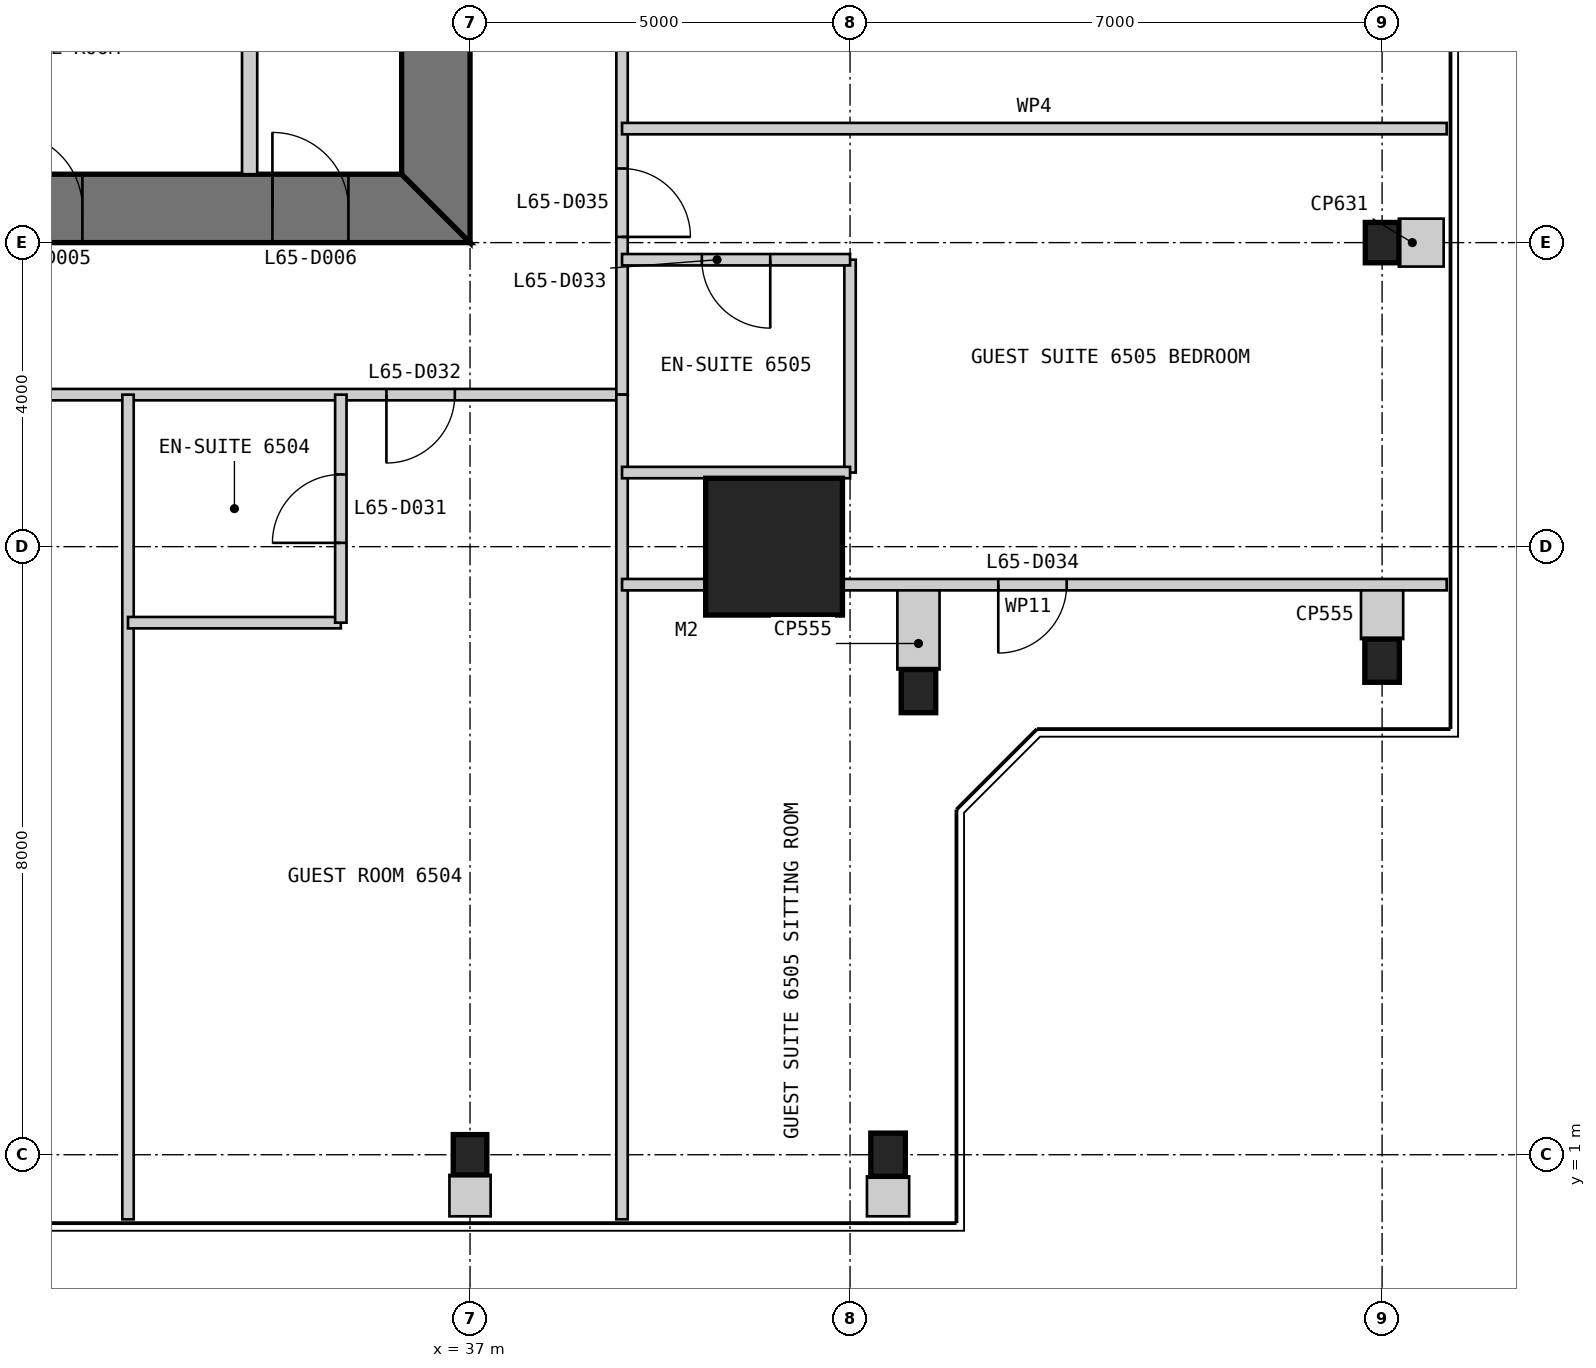
"""IFC4 building model, lengths in metres.
Left out: names, types, materials, properties, quantities, classifications, styles, units other than length and angle.
Written with IfcOpenShell. Run it as: python <this file> out.ifc"""

import sys

from ifc_helpers import new_model, si_unit, direction, frame, frame_2d, origin, origin_2d, place, context, subcontext, project, spatial, polyline, rectangle, i_section, outline, extrude, element, fill, save


model = new_model("IFC4")
c1 = context("Model", 3, precision=1e-05, world=origin(), true_north=direction((0.0, 1.0)))
c2 = subcontext(c1, "Body", "Model", "MODEL_VIEW")
j1 = project(units=[si_unit("LENGTHUNIT", "METRE"), si_unit("PLANEANGLEUNIT", "RADIAN")], contexts=[c1])
p1 = place(None, origin())
s1 = spatial("IfcSite", under=j1, at=p1, CompositionType="ELEMENT")
p2 = place(p1, origin())
s2 = spatial("IfcBuilding", under=s1, at=p2, CompositionType="ELEMENT")
p3 = place(p2, frame((0.0, 0.0, 273.0)))
s3 = spatial("IfcBuildingStorey", under=s2, at=p3, CompositionType="ELEMENT", Elevation=273.0)
p4 = place(p3, frame((41.0, 9.0, 0.0), z_axis=(0.0, 0.0, 1.0), x_axis=(1.0, 0.0, 0.0)))
e1 = element("IfcColumn", 1, at=p4, inside=s3, PredefinedType="COLUMN", context=c2, shape_type="SweptSolid", body=[
    extrude(rectangle(XDim=1.8, YDim=1.8, at=origin_2d()), origin(), (0.0, 0.0, 1.0), 3.4),
])
p5 = place(p3, frame((37.0, 1.0, 0.0), z_axis=(0.0, 0.0, 1.0), x_axis=(1.0, 0.0, 0.0)))
e2 = element("IfcColumn", 2, at=p5, inside=s3, PredefinedType="COLUMN", context=c2, shape_type="SweptSolid", body=[
    extrude(i_section(OverallWidth=0.442, OverallDepth=0.531, WebThickness=0.066, FlangeThickness=0.106, at=origin_2d()), origin(), (0.0, 0.0, 1.0), 3.4),
])
for number, where, z_axis, x_axis in (
    (3, (42.5, 1.0, 0.0), (0.0, 0.0, 1.0), (1.0, 0.0, 0.0)),
    (4, (42.9, 7.1, 0.0), (0.0, 0.0, 1.0), (1.0, 0.0, 0.0)),
    (5, (49.0, 7.5, 0.0), (0.0, 0.0, 1.0), (1.0, 0.0, 0.0)),
):
    element("IfcColumn", number, at=place(p3, frame(where, z_axis=z_axis, x_axis=x_axis)), inside=s3, PredefinedType="COLUMN", context=c2, shape_type="SweptSolid", body=[
        extrude(i_section(OverallWidth=0.455, OverallDepth=0.569, WebThickness=0.078, FlangeThickness=0.125, at=origin_2d()), origin(), (0.0, 0.0, 1.0), 3.4),
    ])
p6 = place(p3, frame((49.0, 13.0, 0.0), z_axis=(0.0, 0.0, 1.0), x_axis=(1.0, 0.0, 0.0)))
e6 = element("IfcColumn", 6, at=p6, inside=s3, PredefinedType="COLUMN", context=c2, shape_type="SweptSolid", body=[
    extrude(i_section(OverallWidth=0.442, OverallDepth=0.531, WebThickness=0.066, FlangeThickness=0.106, at=origin_2d()), origin(), (0.0, 0.0, 1.0), 3.4),
])
p7 = place(p3, frame((13.0, 13.45, 0.0), z_axis=(0.0, 0.0, 1.0), x_axis=(1.0, 0.0, 0.0)))
e7 = element("IfcWall", 7, at=p7, inside=s3, PredefinedType="SHEAR", context=c2, shape_type="SweptSolid", body=[
    extrude(outline(polyline([(0.0, -0.45), (24.0, -0.45), (23.1, 0.45), (0.9, 0.45), (0.0, -0.45)])), origin(), (0.0, 0.0, 1.0), 3.4),
])
p8 = place(p7, frame((4.9, 0.0, 0.0)))
e8 = element("IfcOpeningElement", 8, at=p8, cuts=e7, PredefinedType="OPENING", context=c2, shape_type="SweptSolid", body=[
    extrude(rectangle(XDim=1.0, YDim=2.2, at=frame_2d((0.5, 1.1))), frame((0.0, 0.46, 0.0), z_axis=(0.0, -1.0, 0.0), x_axis=(1.0, 0.0, 0.0)), (0.0, 0.0, 1.0), 0.92),
])
p9 = place(p7, frame((8.9, 0.0, 0.0)))
e9 = element("IfcOpeningElement", 9, at=p9, cuts=e7, PredefinedType="OPENING", context=c2, shape_type="SweptSolid", body=[
    extrude(rectangle(XDim=1.1, YDim=2.2, at=frame_2d((0.55, 1.1))), frame((0.0, 0.46, 0.0), z_axis=(0.0, -1.0, 0.0), x_axis=(1.0, 0.0, 0.0)), (0.0, 0.0, 1.0), 0.92),
])
p10 = place(p7, frame((15.05, 0.0, 0.0)))
e10 = element("IfcOpeningElement", 10, at=p10, cuts=e7, PredefinedType="OPENING", context=c2, shape_type="SweptSolid", body=[
    extrude(rectangle(XDim=0.9, YDim=2.2, at=frame_2d((0.45, 1.1))), frame((0.0, 0.46, 0.0), z_axis=(0.0, -1.0, 0.0), x_axis=(1.0, 0.0, 0.0)), (0.0, 0.0, 1.0), 0.92),
])
p11 = place(p7, frame((17.9, 0.0, 0.0)))
e11 = element("IfcOpeningElement", 11, at=p11, cuts=e7, PredefinedType="OPENING", context=c2, shape_type="SweptSolid", body=[
    extrude(rectangle(XDim=1.0, YDim=2.2, at=frame_2d((0.5, 1.1))), frame((0.0, 0.46, 0.0), z_axis=(0.0, -1.0, 0.0), x_axis=(1.0, 0.0, 0.0)), (0.0, 0.0, 1.0), 0.92),
])
p12 = place(p7, frame((21.4, 0.0, 0.0)))
e12 = element("IfcOpeningElement", 12, at=p12, cuts=e7, PredefinedType="OPENING", context=c2, shape_type="SweptSolid", body=[
    extrude(rectangle(XDim=1.0, YDim=2.2, at=frame_2d((0.5, 1.1))), frame((0.0, 0.46, 0.0), z_axis=(0.0, -1.0, 0.0), x_axis=(1.0, 0.0, 0.0)), (0.0, 0.0, 1.0), 0.92),
])
p13 = place(p3, frame((36.55, 13.9, 0.0), z_axis=(0.0, 0.0, 1.0), x_axis=(0.0, 1.0, 0.0)))
e13 = element("IfcWall", 13, at=p13, inside=s3, PredefinedType="SHEAR", context=c2, shape_type="SweptSolid", body=[
    extrude(outline(polyline([(-0.9, -0.45), (23.1, -0.45), (22.2, 0.45), (0.0, 0.45), (-0.9, -0.45)])), origin(), (0.0, 0.0, 1.0), 3.4),
])
p14 = place(p13, frame((20.2, 0.0, 0.0)))
e14 = element("IfcOpeningElement", 14, at=p14, cuts=e13, PredefinedType="OPENING", context=c2, shape_type="SweptSolid", body=[
    extrude(rectangle(XDim=1.0, YDim=2.2, at=frame_2d((0.5, 1.1))), frame((0.0, 0.46, 0.0), z_axis=(0.0, -1.0, 0.0), x_axis=(1.0, 0.0, 0.0)), (0.0, 0.0, 1.0), 0.92),
])
p15 = place(p13, frame((17.25, 0.0, 0.0)))
e15 = element("IfcOpeningElement", 15, at=p15, cuts=e13, PredefinedType="OPENING", context=c2, shape_type="SweptSolid", body=[
    extrude(rectangle(XDim=0.9, YDim=2.2, at=frame_2d((0.45, 1.1))), frame((0.0, 0.46, 0.0), z_axis=(0.0, -1.0, 0.0), x_axis=(1.0, 0.0, 0.0)), (0.0, 0.0, 1.0), 0.92),
])
p16 = place(p3, frame((34.1, 13.9, 0.0), z_axis=(0.0, 0.0, 1.0), x_axis=(0.0, 1.0, 0.0)))
e16 = element("IfcWall", 16, at=p16, inside=s3, PredefinedType="PARTITIONING", context=c2, shape_type="SweptSolid", body=[
    extrude(rectangle(XDim=6.1, YDim=0.2, at=frame_2d((3.05, 0.0))), origin(), (0.0, 0.0, 1.0), 3.2),
])
p17 = place(p3, frame((11.0, 11.0, 0.0), z_axis=(0.0, 0.0, 1.0), x_axis=(1.0, 0.0, 0.0)))
e17 = element("IfcWall", 17, at=p17, inside=s3, PredefinedType="PARTITIONING", context=c2, shape_type="SweptSolid", body=[
    extrude(rectangle(XDim=28.0, YDim=0.15, at=frame_2d((14.0, 0.0))), origin(), (0.0, 0.0, 1.0), 2.844),
])
p18 = place(p17, frame((1.9, 0.0, 0.0)))
e18 = element("IfcOpeningElement", 18, at=p18, cuts=e17, PredefinedType="OPENING", context=c2, shape_type="SweptSolid", body=[
    extrude(rectangle(XDim=0.9, YDim=2.1, at=frame_2d((0.45, 1.05))), frame((0.0, 0.085, 0.0), z_axis=(0.0, -1.0, 0.0), x_axis=(1.0, 0.0, 0.0)), (0.0, 0.0, 1.0), 0.17),
])
p19 = place(p17, frame((4.7, 0.0, 0.0)))
e19 = element("IfcOpeningElement", 19, at=p19, cuts=e17, PredefinedType="OPENING", context=c2, shape_type="SweptSolid", body=[
    extrude(rectangle(XDim=1.0, YDim=2.1, at=frame_2d((0.5, 1.05))), frame((0.0, 0.085, 0.0), z_axis=(0.0, -1.0, 0.0), x_axis=(1.0, 0.0, 0.0)), (0.0, 0.0, 1.0), 0.17),
])
p20 = place(p17, frame((13.3, 0.0, 0.0)))
e20 = element("IfcOpeningElement", 20, at=p20, cuts=e17, PredefinedType="OPENING", context=c2, shape_type="SweptSolid", body=[
    extrude(rectangle(XDim=0.9, YDim=2.1, at=frame_2d((0.45, 1.05))), frame((0.0, 0.085, 0.0), z_axis=(0.0, -1.0, 0.0), x_axis=(1.0, 0.0, 0.0)), (0.0, 0.0, 1.0), 0.17),
])
p21 = place(p17, frame((24.9, 0.0, 0.0)))
e21 = element("IfcOpeningElement", 21, at=p21, cuts=e17, PredefinedType="OPENING", context=c2, shape_type="SweptSolid", body=[
    extrude(rectangle(XDim=0.9, YDim=2.1, at=frame_2d((0.45, 1.05))), frame((0.0, 0.085, 0.0), z_axis=(0.0, -1.0, 0.0), x_axis=(1.0, 0.0, 0.0)), (0.0, 0.0, 1.0), 0.17),
])
p22 = place(p3, frame((32.5, 0.15, 0.0), z_axis=(0.0, 0.0, 1.0), x_axis=(0.0, 1.0, 0.0)))
e22 = element("IfcWall", 22, at=p22, inside=s3, PredefinedType="PARTITIONING", context=c2, shape_type="SweptSolid", body=[
    extrude(rectangle(XDim=10.85, YDim=0.15, at=frame_2d((5.425, 0.0))), origin(), (0.0, 0.0, 1.0), 3.25),
])
p23 = place(p3, frame((32.5, 8.0, 0.0), z_axis=(0.0, 0.0, 1.0), x_axis=(1.0, 0.0, 0.0)))
e23 = element("IfcWall", 23, at=p23, inside=s3, PredefinedType="PARTITIONING", context=c2, shape_type="SweptSolid", body=[
    extrude(rectangle(XDim=2.8, YDim=0.15, at=frame_2d((1.4, 0.0))), origin(), (0.0, 0.0, 1.0), 3.25),
])
p24 = place(p3, frame((35.3, 8.0, 0.0), z_axis=(0.0, 0.0, 1.0), x_axis=(0.0, 1.0, 0.0)))
e24 = element("IfcWall", 24, at=p24, inside=s3, PredefinedType="PARTITIONING", context=c2, shape_type="SweptSolid", body=[
    extrude(rectangle(XDim=3.0, YDim=0.15, at=frame_2d((1.5, 0.0))), origin(), (0.0, 0.0, 1.0), 3.25),
])
p25 = place(p24, frame((1.05, 0.0, 0.0)))
e25 = element("IfcOpeningElement", 25, at=p25, cuts=e24, PredefinedType="OPENING", context=c2, shape_type="SweptSolid", body=[
    extrude(rectangle(XDim=0.9, YDim=2.1, at=frame_2d((0.45, 1.05))), frame((0.0, 0.085, 0.0), z_axis=(0.0, -1.0, 0.0), x_axis=(1.0, 0.0, 0.0)), (0.0, 0.0, 1.0), 0.17),
])
p26 = place(p3, frame((39.0, 11.0, 0.0), z_axis=(0.0, 0.0, 1.0), x_axis=(0.0, 1.0, 0.0)))
e26 = element("IfcWall", 26, at=p26, inside=s3, PredefinedType="PARTITIONING", context=c2, shape_type="SweptSolid", body=[
    extrude(rectangle(XDim=28.0, YDim=0.15, at=frame_2d((14.0, 0.0))), origin(), (0.0, 0.0, 1.0), 2.844),
])
p27 = place(p26, frame((2.075, 0.0, 0.0)))
e27 = element("IfcOpeningElement", 27, at=p27, cuts=e26, PredefinedType="OPENING", context=c2, shape_type="SweptSolid", body=[
    extrude(rectangle(XDim=0.9, YDim=2.1, at=frame_2d((0.45, 1.05))), frame((0.0, 0.085, 0.0), z_axis=(0.0, -1.0, 0.0), x_axis=(1.0, 0.0, 0.0)), (0.0, 0.0, 1.0), 0.17),
])
p28 = place(p26, frame((5.2, 0.0, 0.0)))
e28 = element("IfcOpeningElement", 28, at=p28, cuts=e26, PredefinedType="OPENING", context=c2, shape_type="SweptSolid", body=[
    extrude(rectangle(XDim=0.9, YDim=2.1, at=frame_2d((0.45, 1.05))), frame((0.0, 0.085, 0.0), z_axis=(0.0, -1.0, 0.0), x_axis=(1.0, 0.0, 0.0)), (0.0, 0.0, 1.0), 0.17),
])
p29 = place(p26, frame((13.3, 0.0, 0.0)))
e29 = element("IfcOpeningElement", 29, at=p29, cuts=e26, PredefinedType="OPENING", context=c2, shape_type="SweptSolid", body=[
    extrude(rectangle(XDim=0.9, YDim=2.1, at=frame_2d((0.45, 1.05))), frame((0.0, 0.085, 0.0), z_axis=(0.0, -1.0, 0.0), x_axis=(1.0, 0.0, 0.0)), (0.0, 0.0, 1.0), 0.17),
])
p30 = place(p26, frame((24.9, 0.0, 0.0)))
e30 = element("IfcOpeningElement", 30, at=p30, cuts=e26, PredefinedType="OPENING", context=c2, shape_type="SweptSolid", body=[
    extrude(rectangle(XDim=0.9, YDim=2.1, at=frame_2d((0.45, 1.05))), frame((0.0, 0.085, 0.0), z_axis=(0.0, -1.0, 0.0), x_axis=(1.0, 0.0, 0.0)), (0.0, 0.0, 1.0), 0.17),
])
p31 = place(p3, frame((39.0, 0.15, 0.0), z_axis=(0.0, 0.0, 1.0), x_axis=(0.0, 1.0, 0.0)))
e31 = element("IfcWall", 31, at=p31, inside=s3, PredefinedType="PARTITIONING", context=c2, shape_type="SweptSolid", body=[
    extrude(rectangle(XDim=10.85, YDim=0.15, at=frame_2d((5.425, 0.0))), origin(), (0.0, 0.0, 1.0), 2.844),
])
p32 = place(p3, frame((42.0, 9.975, 0.0), z_axis=(0.0, 0.0, 1.0), x_axis=(0.0, 1.0, 0.0)))
e32 = element("IfcWall", 32, at=p32, inside=s3, PredefinedType="PARTITIONING", context=c2, shape_type="SweptSolid", body=[
    extrude(rectangle(XDim=2.8, YDim=0.15, at=frame_2d((1.4, 0.0))), origin(), (0.0, 0.0, 1.0), 3.25),
])
p33 = place(p3, frame((42.0, 12.775, 0.0), z_axis=(0.0, 0.0, 1.0), x_axis=(-1.0, 0.0, 0.0)))
e33 = element("IfcWall", 33, at=p33, inside=s3, PredefinedType="PARTITIONING", context=c2, shape_type="SweptSolid", body=[
    extrude(rectangle(XDim=3.0, YDim=0.15, at=frame_2d((1.5, 0.0))), origin(), (0.0, 0.0, 1.0), 3.25),
])
p34 = place(p33, frame((1.05, 0.0, 0.0)))
e34 = element("IfcOpeningElement", 34, at=p34, cuts=e33, PredefinedType="OPENING", context=c2, shape_type="SweptSolid", body=[
    extrude(rectangle(XDim=0.9, YDim=2.1, at=frame_2d((0.45, 1.05))), frame((0.0, 0.085, 0.0), z_axis=(0.0, -1.0, 0.0), x_axis=(1.0, 0.0, 0.0)), (0.0, 0.0, 1.0), 0.17),
])
p35 = place(p3, frame((42.0, 9.975, 0.0), z_axis=(0.0, 0.0, 1.0), x_axis=(-1.0, 0.0, 0.0)))
e35 = element("IfcWall", 35, at=p35, inside=s3, PredefinedType="PARTITIONING", context=c2, shape_type="SweptSolid", body=[
    extrude(rectangle(XDim=3.0, YDim=0.15, at=frame_2d((1.5, 0.0))), origin(), (0.0, 0.0, 1.0), 3.25),
])
p36 = place(p3, frame((49.85, 8.5, 0.0), z_axis=(0.0, 0.0, 1.0), x_axis=(-1.0, 0.0, 0.0)))
e36 = element("IfcWall", 36, at=p36, inside=s3, PredefinedType="PARTITIONING", context=c2, shape_type="SweptSolid", body=[
    extrude(rectangle(XDim=10.85, YDim=0.15, at=frame_2d((5.425, 0.0))), origin(), (0.0, 0.0, 1.0), 3.25),
])
p37 = place(p36, frame((5.0, 0.0, 0.0)))
e37 = element("IfcOpeningElement", 37, at=p37, cuts=e36, PredefinedType="OPENING", context=c2, shape_type="SweptSolid", body=[
    extrude(rectangle(XDim=0.9, YDim=2.1, at=frame_2d((0.45, 1.05))), frame((0.0, 0.085, 0.0), z_axis=(0.0, -1.0, 0.0), x_axis=(1.0, 0.0, 0.0)), (0.0, 0.0, 1.0), 0.17),
])
p38 = place(p3, frame((49.85, 14.5, 0.0), z_axis=(0.0, 0.0, 1.0), x_axis=(-1.0, 0.0, 0.0)))
e38 = element("IfcWall", 38, at=p38, inside=s3, PredefinedType="PARTITIONING", context=c2, shape_type="SweptSolid", body=[
    extrude(rectangle(XDim=10.85, YDim=0.15, at=frame_2d((5.425, 0.0))), origin(), (0.0, 0.0, 1.0), 3.25),
])
p39 = place(p3, frame((37.0, 0.19, 0.0), z_axis=(0.0, 0.0, 1.0), x_axis=(0.0, 1.0, 0.0)))
e39 = element("IfcWall", 39, at=p39, inside=s3, PredefinedType="PARTITIONING", context=c2, shape_type="SweptSolid", body=[
    extrude(rectangle(XDim=0.545, YDim=0.542, at=frame_2d((0.272, 0.0))), origin(), (0.0, 0.0, 1.0), 3.25),
])
p40 = place(p3, frame((42.5, 0.19, 0.0), z_axis=(0.0, 0.0, 1.0), x_axis=(0.0, 1.0, 0.0)))
e40 = element("IfcWall", 40, at=p40, inside=s3, PredefinedType="PARTITIONING", context=c2, shape_type="SweptSolid", body=[
    extrude(rectangle(XDim=0.526, YDim=0.555, at=frame_2d((0.263, 0.0))), origin(), (0.0, 0.0, 1.0), 3.25),
])
p41 = place(p3, frame((42.9, 8.425, 0.0), z_axis=(0.0, 0.0, 1.0), x_axis=(0.0, -1.0, 0.0)))
e41 = element("IfcWall", 41, at=p41, inside=s3, PredefinedType="PARTITIONING", context=c2, shape_type="SweptSolid", body=[
    extrude(rectangle(XDim=1.041, YDim=0.555, at=frame_2d((0.52, 0.0))), origin(), (0.0, 0.0, 1.0), 3.25),
])
p42 = place(p3, frame((49.0, 8.425, 0.0), z_axis=(0.0, 0.0, 1.0), x_axis=(0.0, -1.0, 0.0)))
e42 = element("IfcWall", 42, at=p42, inside=s3, PredefinedType="PARTITIONING", context=c2, shape_type="SweptSolid", body=[
    extrude(rectangle(XDim=0.641, YDim=0.555, at=frame_2d((0.32, 0.0))), origin(), (0.0, 0.0, 1.0), 2.338),
])
p43 = place(p3, frame((49.81, 13.0, 0.0), z_axis=(0.0, 0.0, 1.0), x_axis=(-1.0, 0.0, 0.0)))
e43 = element("IfcWall", 43, at=p43, inside=s3, PredefinedType="PARTITIONING", context=c2, shape_type="SweptSolid", body=[
    extrude(rectangle(XDim=0.589, YDim=0.631, at=frame_2d((0.294, 0.0))), origin(), (0.0, 0.0, 1.0), 3.25),
])
p44 = place(p11, origin())
e44 = element("IfcDoor", 44, at=p44, inside=s3, OperationType="SINGLE_SWING_LEFT", PredefinedType="DOOR", context=c2, shape_type="SweptSolid", body=[
    extrude(rectangle(XDim=1.0, YDim=2.2, at=frame_2d((0.5, 1.1))), frame((0.0, 0.025, 0.0), z_axis=(0.0, -1.0, 0.0), x_axis=(1.0, 0.0, 0.0)), (0.0, 0.0, 1.0), 0.05),
    extrude(outline(polyline([(0.0, 0.0), (0.04, 0.0), (0.04, 2.16), (0.96, 2.16), (0.96, 0.0), (1.0, 0.0), (1.0, 2.2), (0.0, 2.2), (0.0, 0.0)])), frame((0.0, 0.3, 0.0), z_axis=(0.0, -1.0, 0.0), x_axis=(1.0, 0.0, 0.0)), (0.0, 0.0, 1.0), 0.6),
])
fill(e11, e44)
p45 = place(p12, origin())
e45 = element("IfcDoor", 45, at=p45, inside=s3, OperationType="SINGLE_SWING_LEFT", PredefinedType="DOOR", context=c2, shape_type="SweptSolid", body=[
    extrude(rectangle(XDim=1.0, YDim=2.2, at=frame_2d((0.5, 1.1))), frame((0.0, 0.025, 0.0), z_axis=(0.0, -1.0, 0.0), x_axis=(1.0, 0.0, 0.0)), (0.0, 0.0, 1.0), 0.05),
    extrude(outline(polyline([(0.0, 0.0), (0.04, 0.0), (0.04, 2.16), (0.96, 2.16), (0.96, 0.0), (1.0, 0.0), (1.0, 2.2), (0.0, 2.2), (0.0, 0.0)])), frame((0.0, 0.3, 0.0), z_axis=(0.0, -1.0, 0.0), x_axis=(1.0, 0.0, 0.0)), (0.0, 0.0, 1.0), 0.6),
])
fill(e12, e45)
p46 = place(p25, origin())
e46 = element("IfcDoor", 46, at=p46, inside=s3, OperationType="SINGLE_SWING_LEFT", PredefinedType="DOOR", context=c2, shape_type="SweptSolid", body=[
    extrude(rectangle(XDim=0.9, YDim=2.1, at=frame_2d((0.45, 1.05))), frame((0.0, 0.025, 0.0), z_axis=(0.0, -1.0, 0.0), x_axis=(1.0, 0.0, 0.0)), (0.0, 0.0, 1.0), 0.05),
])
fill(e25, e46)
p47 = place(p21, frame((0.9, 0.0, 0.0), z_axis=(0.0, 0.0, 1.0), x_axis=(-1.0, 0.0, 0.0)))
e47 = element("IfcDoor", 47, at=p47, inside=s3, OperationType="SINGLE_SWING_RIGHT", PredefinedType="DOOR", context=c2, shape_type="SweptSolid", body=[
    extrude(rectangle(XDim=0.9, YDim=2.1, at=frame_2d((0.45, 1.05))), frame((0.0, 0.025, 0.0), z_axis=(0.0, -1.0, 0.0), x_axis=(1.0, 0.0, 0.0)), (0.0, 0.0, 1.0), 0.05),
])
fill(e21, e47)
p48 = place(p34, origin())
e48 = element("IfcDoor", 48, at=p48, inside=s3, OperationType="SINGLE_SWING_LEFT", PredefinedType="DOOR", context=c2, shape_type="SweptSolid", body=[
    extrude(rectangle(XDim=0.9, YDim=2.1, at=frame_2d((0.45, 1.05))), frame((0.0, 0.025, 0.0), z_axis=(0.0, -1.0, 0.0), x_axis=(1.0, 0.0, 0.0)), (0.0, 0.0, 1.0), 0.05),
])
fill(e34, e48)
p49 = place(p37, origin())
e49 = element("IfcDoor", 49, at=p49, inside=s3, OperationType="SINGLE_SWING_RIGHT", PredefinedType="DOOR", context=c2, shape_type="SweptSolid", body=[
    extrude(rectangle(XDim=0.9, YDim=2.1, at=frame_2d((0.45, 1.05))), frame((0.0, 0.025, 0.0), z_axis=(0.0, -1.0, 0.0), x_axis=(1.0, 0.0, 0.0)), (0.0, 0.0, 1.0), 0.05),
])
fill(e37, e49)
p50 = place(p27, frame((0.9, 0.0, 0.0), z_axis=(0.0, 0.0, 1.0), x_axis=(-1.0, 0.0, 0.0)))
e50 = element("IfcDoor", 50, at=p50, inside=s3, OperationType="SINGLE_SWING_RIGHT", PredefinedType="DOOR", context=c2, shape_type="SweptSolid", body=[
    extrude(rectangle(XDim=0.9, YDim=2.1, at=frame_2d((0.45, 1.05))), frame((0.0, 0.025, 0.0), z_axis=(0.0, -1.0, 0.0), x_axis=(1.0, 0.0, 0.0)), (0.0, 0.0, 1.0), 0.05),
])
fill(e27, e50)
save(model, sys.argv[1])
